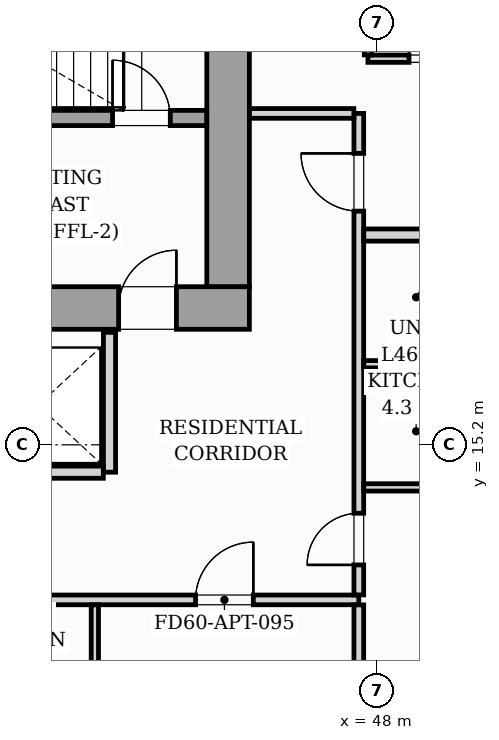
"""IFC4 building model, lengths in metres.
Left out: names, types, materials, properties, quantities, classifications, styles, units other than length and angle.
Written with IfcOpenShell. Run it as: python <this file> out.ifc"""

import sys

from ifc_helpers import new_model, si_unit, direction, frame, frame_2d, origin, origin_2d, place, context, subcontext, project, spatial, rectangle, i_section, extrude, source, transform, mapped, element, fill, save


model = new_model("IFC4")
c1 = context("Model", 3, precision=1e-05, world=origin(), true_north=direction((0.0, 1.0)))
c2 = subcontext(c1, "Body", "Model", "MODEL_VIEW")
j1 = project(units=[si_unit("LENGTHUNIT", "METRE"), si_unit("PLANEANGLEUNIT", "RADIAN")], contexts=[c1])
p1 = place(None, origin())
s1 = spatial("IfcSite", under=j1, at=p1, CompositionType="ELEMENT")
p2 = place(p1, origin())
s2 = spatial("IfcBuilding", under=s1, at=p2, CompositionType="ELEMENT")
p3 = place(p2, frame((0.0, 0.0, 159.8)))
s3 = spatial("IfcBuildingStorey", under=s2, at=p3, CompositionType="ELEMENT", Elevation=159.8)
m1 = source(origin(), c2, "Body", "SweptSolid", [
    extrude(i_section(OverallWidth=0.421, OverallDepth=0.465, WebThickness=0.045, FlangeThickness=0.073, FilletRadius=0.018, at=origin_2d()), origin(), (0.0, 0.0, 1.0), 3.196),
])
p4 = place(p3, frame((45.6, 17.4, 0.002), z_axis=(0.0, 0.0, 1.0), x_axis=(1.0, 0.0, 0.0)))
e1 = element("IfcColumn", 1, at=p4, inside=s3, PredefinedType="PILASTER", context=c2, shape_type="MappedRepresentation", body=[
    mapped(m1, transform((0.0, 0.0, 0.0), scale=1.0)),
])
p5 = place(p3, frame((26.1, 17.45, 0.0), z_axis=(0.0, 0.0, 1.0), x_axis=(1.0, 0.0, 0.0)))
e2 = element("IfcWall", 2, at=p5, inside=s3, PredefinedType="SHEAR", context=c2, shape_type="SweptSolid", body=[
    extrude(rectangle(XDim=19.8, YDim=0.7, at=frame_2d((9.9, 0.0))), origin(), (0.0, 0.0, 1.0), 3.2),
])
p6 = place(p5, frame((1.05, 0.0, 0.0)))
e3 = element("IfcOpeningElement", 3, at=p6, cuts=e2, PredefinedType="OPENING", context=c2, shape_type="SweptSolid", body=[
    extrude(rectangle(XDim=0.95, YDim=2.06, at=frame_2d((0.475, 1.03))), frame((0.0, 0.36, 0.0), z_axis=(0.0, -1.0, 0.0), x_axis=(1.0, 0.0, 0.0)), (0.0, 0.0, 1.0), 0.72),
])
p7 = place(p5, frame((9.48, 0.0, 0.0)))
e4 = element("IfcOpeningElement", 4, at=p7, cuts=e2, PredefinedType="OPENING", context=c2, shape_type="SweptSolid", body=[
    extrude(rectangle(XDim=0.85, YDim=2.0, at=frame_2d((0.425, 1.0))), frame((0.0, 0.36, 0.0), z_axis=(0.0, -1.0, 0.0), x_axis=(1.0, 0.0, 0.0)), (0.0, 0.0, 1.0), 0.72),
])
p8 = place(p5, frame((17.65, 0.0, 0.0)))
e5 = element("IfcOpeningElement", 5, at=p8, cuts=e2, PredefinedType="OPENING", context=c2, shape_type="SweptSolid", body=[
    extrude(rectangle(XDim=0.95, YDim=2.06, at=frame_2d((0.475, 1.03))), frame((0.0, 0.36, 0.0), z_axis=(0.0, -1.0, 0.0), x_axis=(1.0, 0.0, 0.0)), (0.0, 0.0, 1.0), 0.72),
])
p9 = place(p3, frame((45.55, 17.802, 0.0), z_axis=(0.0, 0.0, 1.0), x_axis=(0.0, 1.0, 0.0)))
e6 = element("IfcWall", 6, at=p9, inside=s3, PredefinedType="SHEAR", context=c2, shape_type="SweptSolid", body=[
    extrude(rectangle(XDim=5.796, YDim=0.7, at=frame_2d((2.898, 0.0))), origin(), (0.0, 0.0, 1.0), 3.2),
])
p10 = place(p3, frame((37.05, 20.575, 0.0), z_axis=(0.0, 0.0, 1.0), x_axis=(1.0, 0.0, 0.0)))
e7 = element("IfcWall", 7, at=p10, inside=s3, PredefinedType="SOLIDWALL", context=c2, shape_type="SweptSolid", body=[
    extrude(rectangle(XDim=8.148, YDim=0.25, at=frame_2d((4.074, 0.0))), origin(), (0.0, 0.0, 1.0), 3.2),
])
p11 = place(p10, frame((6.6, 0.0, 0.0)))
e8 = element("IfcOpeningElement", 8, at=p11, cuts=e7, PredefinedType="OPENING", context=c2, shape_type="SweptSolid", body=[
    extrude(rectangle(XDim=0.95, YDim=2.06, at=frame_2d((0.475, 1.03))), frame((0.0, 0.135, 0.0), z_axis=(0.0, -1.0, 0.0), x_axis=(1.0, 0.0, 0.0)), (0.0, 0.0, 1.0), 0.27),
])
p12 = place(p3, frame((43.6, 14.75, 0.0), z_axis=(0.0, 0.0, 1.0), x_axis=(0.0, 1.0, 0.0)))
e9 = element("IfcWall", 9, at=p12, inside=s3, PredefinedType="PARTITIONING", context=c2, shape_type="SweptSolid", body=[
    extrude(rectangle(XDim=2.3, YDim=0.2, at=frame_2d((1.15, 0.0))), origin(), (0.0, 0.0, 1.0), 2.9),
])
p13 = place(p3, frame((41.352, 14.75, 0.0), z_axis=(0.0, 0.0, 1.0), x_axis=(1.0, 0.0, 0.0)))
e10 = element("IfcWall", 10, at=p13, inside=s3, PredefinedType="PARTITIONING", context=c2, shape_type="SweptSolid", body=[
    extrude(rectangle(XDim=2.146, YDim=0.2, at=frame_2d((1.073, 0.0))), origin(), (0.0, 0.0, 1.0), 2.9),
])
p14 = place(p3, frame((22.05, 12.65, 0.0), z_axis=(0.0, 0.0, 1.0), x_axis=(1.0, 0.0, 0.0)))
e11 = element("IfcWall", 11, at=p14, inside=s3, PredefinedType="PARTITIONING", context=c2, shape_type="SweptSolid", body=[
    extrude(rectangle(XDim=25.65, YDim=0.16, at=frame_2d((12.825, 0.0))), origin(), (0.0, 0.0, 1.0), 2.9),
])
p15 = place(p14, frame((1.736, 0.0, 0.0)))
e12 = element("IfcOpeningElement", 12, at=p15, cuts=e11, PredefinedType="OPENING", context=c2, shape_type="SweptSolid", body=[
    extrude(rectangle(XDim=0.95, YDim=2.06, at=frame_2d((0.475, 1.03))), frame((0.0, 0.09, 0.0), z_axis=(0.0, -1.0, 0.0), x_axis=(1.0, 0.0, 0.0)), (0.0, 0.0, 1.0), 0.18),
])
p16 = place(p14, frame((10.3, 0.0, 0.0)))
e13 = element("IfcOpeningElement", 13, at=p16, cuts=e11, PredefinedType="OPENING", context=c2, shape_type="SweptSolid", body=[
    extrude(rectangle(XDim=0.95, YDim=2.06, at=frame_2d((0.475, 1.03))), frame((0.0, 0.09, 0.0), z_axis=(0.0, -1.0, 0.0), x_axis=(1.0, 0.0, 0.0)), (0.0, 0.0, 1.0), 0.18),
])
p17 = place(p14, frame((22.965, 0.0, 0.0)))
e14 = element("IfcOpeningElement", 14, at=p17, cuts=e11, PredefinedType="OPENING", context=c2, shape_type="SweptSolid", body=[
    extrude(rectangle(XDim=0.95, YDim=2.06, at=frame_2d((0.475, 1.03))), frame((0.0, 0.09, 0.0), z_axis=(0.0, -1.0, 0.0), x_axis=(1.0, 0.0, 0.0)), (0.0, 0.0, 1.0), 0.18),
])
p18 = place(p3, frame((47.7, 5.783, 0.0), z_axis=(0.0, 0.0, 1.0), x_axis=(0.0, 1.0, 0.0)))
e15 = element("IfcWall", 15, at=p18, inside=s3, PredefinedType="PARTITIONING", context=c2, shape_type="SweptSolid", body=[
    extrude(rectangle(XDim=6.785, YDim=0.16, at=frame_2d((3.393, 0.0))), origin(), (0.0, 0.0, 1.0), 2.9),
])
p19 = place(p3, frame((47.7, 12.732, 0.0), z_axis=(0.0, 0.0, 1.0), x_axis=(0.0, 1.0, 0.0)))
e16 = element("IfcWall", 16, at=p19, inside=s3, PredefinedType="PARTITIONING", context=c2, shape_type="SweptSolid", body=[
    extrude(rectangle(XDim=7.918, YDim=0.16, at=frame_2d((3.959, 0.0))), origin(), (0.0, 0.0, 1.0), 2.9),
])
p20 = place(p19, frame((0.493, 0.0, 0.0)))
e17 = element("IfcOpeningElement", 17, at=p20, cuts=e16, PredefinedType="OPENING", context=c2, shape_type="SweptSolid", body=[
    extrude(rectangle(XDim=0.85, YDim=2.0, at=frame_2d((0.425, 1.0))), frame((0.0, 0.09, 0.0), z_axis=(0.0, -1.0, 0.0), x_axis=(1.0, 0.0, 0.0)), (0.0, 0.0, 1.0), 0.18),
])
p21 = place(p19, frame((6.311, 0.0, 0.0)))
e18 = element("IfcOpeningElement", 18, at=p21, cuts=e16, PredefinedType="OPENING", context=c2, shape_type="SweptSolid", body=[
    extrude(rectangle(XDim=0.95, YDim=2.06, at=frame_2d((0.475, 1.03))), frame((0.0, 0.09, 0.0), z_axis=(0.0, -1.0, 0.0), x_axis=(1.0, 0.0, 0.0)), (0.0, 0.0, 1.0), 0.18),
])
p22 = place(p3, frame((45.902, 20.65, 0.0), z_axis=(0.0, 0.0, 1.0), x_axis=(1.0, 0.0, 0.0)))
e19 = element("IfcWall", 19, at=p22, inside=s3, PredefinedType="PARTITIONING", context=c2, shape_type="SweptSolid", body=[
    extrude(rectangle(XDim=1.716, YDim=0.16, at=frame_2d((0.858, 0.0))), origin(), (0.0, 0.0, 1.0), 2.9),
])
p23 = place(p3, frame((43.359, 10.462, 0.0), z_axis=(0.0, 0.0, 1.0), x_axis=(0.0, 1.0, 0.0)))
e20 = element("IfcWall", 20, at=p23, inside=s3, PredefinedType="PARTITIONING", context=c2, shape_type="SweptSolid", body=[
    extrude(rectangle(XDim=2.106, YDim=0.12, at=frame_2d((1.053, 0.0))), origin(), (0.0, 0.0, 1.0), 2.9),
])
p24 = place(p3, frame((47.782, 18.65, 0.0), z_axis=(0.0, 0.0, 1.0), x_axis=(1.0, 0.0, 0.0)))
e21 = element("IfcWall", 21, at=p24, inside=s3, PredefinedType="PARTITIONING", context=c2, shape_type="SweptSolid", body=[
    extrude(rectangle(XDim=12.04, YDim=0.2, at=frame_2d((6.02, 0.0))), origin(), (0.0, 0.0, 1.0), 2.9),
])
p25 = place(p3, frame((47.782, 16.525, 0.0), z_axis=(0.0, 0.0, 1.0), x_axis=(1.0, 0.0, 0.0)))
e22 = element("IfcWall", 22, at=p25, inside=s3, PredefinedType="PARTITIONING", context=c2, shape_type="SweptSolid", body=[
    extrude(rectangle(XDim=2.256, YDim=0.12, at=frame_2d((1.128, 0.0))), origin(), (0.0, 0.0, 1.0), 2.023),
])
p26 = place(p3, frame((47.782, 14.5, 0.0), z_axis=(0.0, 0.0, 1.0), x_axis=(1.0, 0.0, 0.0)))
e23 = element("IfcWall", 23, at=p26, inside=s3, PredefinedType="PARTITIONING", context=c2, shape_type="SweptSolid", body=[
    extrude(rectangle(XDim=2.256, YDim=0.12, at=frame_2d((1.128, 0.0))), origin(), (0.0, 0.0, 1.0), 2.9),
])
p27 = place(p3, frame((47.85, 21.55, 0.0), z_axis=(0.0, 0.0, 1.0), x_axis=(1.0, 0.0, 0.0)))
e24 = element("IfcWall", 24, at=p27, inside=s3, PredefinedType="PARTITIONING", context=c2, shape_type="SweptSolid", body=[
    extrude(rectangle(XDim=4.2, YDim=0.12, at=frame_2d((2.1, 0.0))), origin(), (0.0, 0.0, 1.0), 2.9),
])
p28 = place(p27, frame((0.675, 0.0, 0.0)))
e25 = element("IfcOpeningElement", 25, at=p28, cuts=e24, PredefinedType="OPENING", context=c2, shape_type="SweptSolid", body=[
    extrude(rectangle(XDim=0.85, YDim=2.05, at=frame_2d((0.425, 1.025))), frame((0.0, 0.07, 0.0), z_axis=(0.0, -1.0, 0.0), x_axis=(1.0, 0.0, 0.0)), (0.0, 0.0, 1.0), 0.14),
])
p29 = place(p27, frame((2.8, 0.0, 0.0)))
e26 = element("IfcOpeningElement", 26, at=p29, cuts=e24, PredefinedType="OPENING", context=c2, shape_type="SweptSolid", body=[
    extrude(rectangle(XDim=0.8, YDim=2.02, at=frame_2d((0.4, 1.01))), frame((0.0, 0.07, 0.0), z_axis=(0.0, -1.0, 0.0), x_axis=(1.0, 0.0, 0.0)), (0.0, 0.0, 1.0), 0.14),
])
p30 = place(p3, frame((47.85, 21.612, 0.0), z_axis=(0.0, 0.0, 1.0), x_axis=(0.0, 1.0, 0.0)))
e27 = element("IfcWall", 27, at=p30, inside=s3, PredefinedType="PARTITIONING", context=c2, shape_type="SweptSolid", body=[
    extrude(rectangle(XDim=2.126, YDim=0.12, at=frame_2d((1.063, 0.0))), origin(), (0.0, 0.0, 1.0), 2.9),
])
m2 = source(origin(), c2, "Body", "SweptSolid", [
    extrude(rectangle(XDim=0.95, YDim=2.06, at=frame_2d((0.475, 1.03))), frame((0.0, 0.025, 0.0), z_axis=(0.0, -1.0, 0.0), x_axis=(1.0, 0.0, 0.0)), (0.0, 0.0, 1.0), 0.05),
])
p31 = place(p8, origin())
e28 = element("IfcDoor", 28, at=p31, inside=s3, OperationType="SINGLE_SWING_RIGHT", PredefinedType="DOOR", context=c2, shape_type="MappedRepresentation", body=[
    mapped(m2, transform((0.0, 0.0, 0.0), scale=1.0)),
])
fill(e5, e28)
p32 = place(p11, origin())
e29 = element("IfcDoor", 29, at=p32, inside=s3, OperationType="SINGLE_SWING_LEFT", PredefinedType="DOOR", context=c2, shape_type="MappedRepresentation", body=[
    mapped(m2, transform((0.0, 0.0, 0.0), scale=1.0)),
])
fill(e8, e29)
m3 = source(origin(), c2, "Body", "SweptSolid", [
    extrude(rectangle(XDim=0.95, YDim=2.06, at=frame_2d((0.475, 1.03))), frame((0.0, 0.025, 0.0), z_axis=(0.0, -1.0, 0.0), x_axis=(1.0, 0.0, 0.0)), (0.0, 0.0, 1.0), 0.05),
])
p33 = place(p17, origin())
e30 = element("IfcDoor", 30, at=p33, inside=s3, OperationType="SINGLE_SWING_RIGHT", PredefinedType="DOOR", context=c2, shape_type="MappedRepresentation", body=[
    mapped(m3, transform((0.0, 0.0, 0.0), scale=1.0)),
])
fill(e14, e30)
m4 = source(origin(), c2, "Body", "SweptSolid", [
    extrude(rectangle(XDim=0.85, YDim=2.0, at=frame_2d((0.425, 1.0))), frame((0.0, 0.025, 0.0), z_axis=(0.0, -1.0, 0.0), x_axis=(1.0, 0.0, 0.0)), (0.0, 0.0, 1.0), 0.05),
])
p34 = place(p20, origin())
e31 = element("IfcDoor", 31, at=p34, inside=s3, OperationType="SINGLE_SWING_LEFT", PredefinedType="DOOR", context=c2, shape_type="MappedRepresentation", body=[
    mapped(m4, transform((0.0, 0.0, 0.0), scale=1.0)),
])
fill(e17, e31)
p35 = place(p21, origin())
e32 = element("IfcDoor", 32, at=p35, inside=s3, OperationType="SINGLE_SWING_RIGHT", PredefinedType="DOOR", context=c2, shape_type="MappedRepresentation", body=[
    mapped(m3, transform((0.0, 0.0, 0.0), scale=1.0)),
])
fill(e18, e32)
m5 = source(origin(), c2, "Body", "SweptSolid", [
    extrude(rectangle(XDim=0.85, YDim=2.05, at=frame_2d((0.425, 1.025))), frame((0.0, 0.025, 0.0), z_axis=(0.0, -1.0, 0.0), x_axis=(1.0, 0.0, 0.0)), (0.0, 0.0, 1.0), 0.05),
])
p36 = place(p28, origin())
e33 = element("IfcDoor", 33, at=p36, inside=s3, OperationType="SINGLE_SWING_LEFT", PredefinedType="DOOR", context=c2, shape_type="MappedRepresentation", body=[
    mapped(m5, transform((0.0, 0.0, 0.0), scale=1.0)),
])
fill(e25, e33)
save(model, sys.argv[1])
